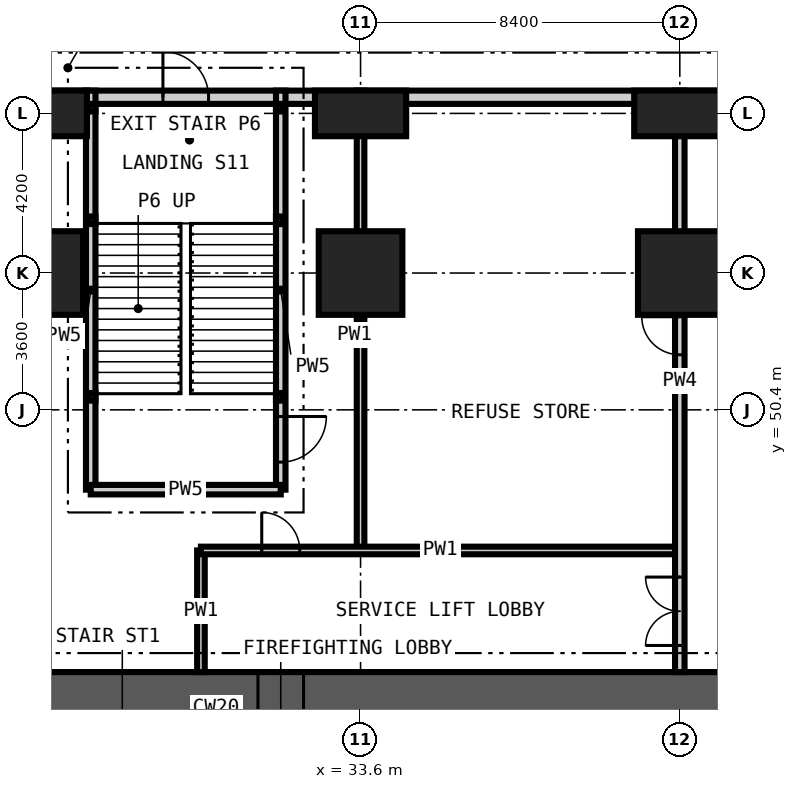
"""IFC4 building model, lengths in metres.
Left out: names, types, materials, properties, quantities, classifications, styles, units other than length and angle.
Written with IfcOpenShell. Run it as: python <this file> out.ifc"""

import sys

from ifc_helpers import new_model, si_unit, direction, frame, frame_2d, origin, origin_2d, place, context, subcontext, project, spatial, rectangle, hollow_rectangle, extrude, element, fill, save


model = new_model("IFC4")
c1 = context("Model", 3, precision=1e-05, world=origin(), true_north=direction((0.0, 1.0)))
c2 = subcontext(c1, "Body", "Model", "MODEL_VIEW")
j1 = project(units=[si_unit("LENGTHUNIT", "METRE"), si_unit("PLANEANGLEUNIT", "RADIAN")], contexts=[c1])
p1 = place(None, origin())
s1 = spatial("IfcSite", under=j1, at=p1, CompositionType="ELEMENT")
p2 = place(p1, origin())
s2 = spatial("IfcBuilding", under=s1, at=p2, CompositionType="ELEMENT")
p3 = place(p2, origin())
s3 = spatial("IfcBuildingStorey", under=s2, at=p3, CompositionType="ELEMENT", Elevation=0.0)
p4 = place(p3, frame((25.2, 54.0, -0.3), z_axis=(0.0, 0.0, 1.0), x_axis=(1.0, 0.0, 0.0)))
e1 = element("IfcColumn", 1, at=p4, inside=s3, PredefinedType="COLUMN", context=c2, shape_type="SweptSolid", body=[
    extrude(rectangle(XDim=2.2, YDim=2.2, at=origin_2d()), origin(), (0.0, 0.0, 1.0), 6.0),
])
p5 = place(p3, frame((25.2, 58.2, -0.3), z_axis=(0.0, 0.0, 1.0), x_axis=(1.0, 0.0, 0.0)))
e2 = element("IfcColumn", 2, at=p5, inside=s3, PredefinedType="COLUMN", context=c2, shape_type="SweptSolid", body=[
    extrude(rectangle(XDim=2.4, YDim=1.2, at=origin_2d()), origin(), (0.0, 0.0, 1.0), 6.0),
])
p6 = place(p3, frame((33.6, 54.0, -0.3), z_axis=(0.0, 0.0, 1.0), x_axis=(1.0, 0.0, 0.0)))
e3 = element("IfcColumn", 3, at=p6, inside=s3, PredefinedType="COLUMN", context=c2, shape_type="SweptSolid", body=[
    extrude(rectangle(XDim=2.2, YDim=2.2, at=origin_2d()), origin(), (0.0, 0.0, 1.0), 6.0),
])
p7 = place(p3, frame((33.6, 58.2, -0.3), z_axis=(0.0, 0.0, 1.0), x_axis=(1.0, 0.0, 0.0)))
e4 = element("IfcColumn", 4, at=p7, inside=s3, PredefinedType="COLUMN", context=c2, shape_type="SweptSolid", body=[
    extrude(rectangle(XDim=2.4, YDim=1.2, at=origin_2d()), origin(), (0.0, 0.0, 1.0), 6.0),
])
p8 = place(p3, frame((42.0, 54.0, -0.3), z_axis=(0.0, 0.0, 1.0), x_axis=(1.0, 0.0, 0.0)))
e5 = element("IfcColumn", 5, at=p8, inside=s3, PredefinedType="COLUMN", context=c2, shape_type="SweptSolid", body=[
    extrude(rectangle(XDim=2.2, YDim=2.2, at=origin_2d()), origin(), (0.0, 0.0, 1.0), 6.0),
])
p9 = place(p3, frame((42.0, 58.2, -0.3), z_axis=(0.0, 0.0, 1.0), x_axis=(1.0, 0.0, 0.0)))
e6 = element("IfcColumn", 6, at=p9, inside=s3, PredefinedType="COLUMN", context=c2, shape_type="SweptSolid", body=[
    extrude(rectangle(XDim=2.4, YDim=1.2, at=origin_2d()), origin(), (0.0, 0.0, 1.0), 6.0),
])
p10 = place(p3, frame((43.5, 42.5, -0.3), z_axis=(0.0, 0.0, 1.0), x_axis=(-1.0, 0.0, 0.0)))
e7 = element("IfcWall", 7, at=p10, inside=s3, PredefinedType="SHEAR", context=c2, shape_type="SweptSolid", body=[
    extrude(rectangle(XDim=28.2, YDim=2.0, at=frame_2d((14.1, 0.0))), origin(), (0.0, 0.0, 1.0), 6.0),
])
p11 = place(p10, frame((22.0, 0.0, 0.3)))
e8 = element("IfcOpeningElement", 8, at=p11, cuts=e7, PredefinedType="OPENING", context=c2, shape_type="SweptSolid", body=[
    extrude(rectangle(XDim=1.0, YDim=2.1, at=frame_2d((0.5, 1.05))), frame((0.0, 1.01, 0.0), z_axis=(0.0, -1.0, 0.0), x_axis=(1.0, 0.0, 0.0)), (0.0, 0.0, 1.0), 2.02),
])
p12 = place(p10, frame((11.4, 0.0, 0.3)))
e9 = element("IfcOpeningElement", 9, at=p12, cuts=e7, PredefinedType="OPENING", context=c2, shape_type="SweptSolid", body=[
    extrude(rectangle(XDim=1.2, YDim=2.2, at=frame_2d((0.6, 1.1))), frame((0.0, 1.01, 0.0), z_axis=(0.0, -1.0, 0.0), x_axis=(1.0, 0.0, 0.0)), (0.0, 0.0, 1.0), 2.02),
])
p13 = place(p3, frame((58.8, 58.625, 0.0), z_axis=(0.0, 0.0, 1.0), x_axis=(-1.0, 0.0, 0.0)))
e10 = element("IfcWall", 10, at=p13, inside=s3, PredefinedType="SOLIDWALL", context=c2, shape_type="SweptSolid", body=[
    extrude(rectangle(XDim=92.4, YDim=0.35, at=frame_2d((46.2, 0.0))), origin(), (0.0, 0.0, 1.0), 5.7),
])
p14 = place(p13, frame((85.2, 0.0, 0.0)))
e11 = element("IfcOpeningElement", 11, at=p14, cuts=e10, PredefinedType="OPENING", context=c2, shape_type="SweptSolid", body=[
    extrude(rectangle(XDim=1.8, YDim=2.7, at=frame_2d((0.9, 1.35))), frame((0.0, 0.185, 0.0), z_axis=(0.0, -1.0, 0.0), x_axis=(1.0, 0.0, 0.0)), (0.0, 0.0, 1.0), 0.37),
])
p15 = place(p13, frame((87.2, 0.0, 0.9)))
e12 = element("IfcOpeningElement", 12, at=p15, cuts=e10, PredefinedType="OPENING", context=c2, shape_type="SweptSolid", body=[
    extrude(rectangle(XDim=2.4, YDim=2.4, at=frame_2d((1.2, 1.2))), frame((0.0, 0.185, 0.0), z_axis=(0.0, -1.0, 0.0), x_axis=(1.0, 0.0, 0.0)), (0.0, 0.0, 1.0), 0.37),
])
p16 = place(p13, frame((80.7, 0.0, 0.9)))
e13 = element("IfcOpeningElement", 13, at=p16, cuts=e10, PredefinedType="OPENING", context=c2, shape_type="SweptSolid", body=[
    extrude(rectangle(XDim=2.4, YDim=2.4, at=frame_2d((1.2, 1.2))), frame((0.0, 0.185, 0.0), z_axis=(0.0, -1.0, 0.0), x_axis=(1.0, 0.0, 0.0)), (0.0, 0.0, 1.0), 0.37),
])
p17 = place(p13, frame((76.2, 0.0, 0.9)))
e14 = element("IfcOpeningElement", 14, at=p17, cuts=e10, PredefinedType="OPENING", context=c2, shape_type="SweptSolid", body=[
    extrude(rectangle(XDim=2.4, YDim=2.4, at=frame_2d((1.2, 1.2))), frame((0.0, 0.185, 0.0), z_axis=(0.0, -1.0, 0.0), x_axis=(1.0, 0.0, 0.0)), (0.0, 0.0, 1.0), 0.37),
])
p18 = place(p13, frame((71.9, 0.0, 0.0)))
e15 = element("IfcOpeningElement", 15, at=p18, cuts=e10, PredefinedType="OPENING", context=c2, shape_type="SweptSolid", body=[
    extrude(rectangle(XDim=1.2, YDim=2.4, at=frame_2d((0.6, 1.2))), frame((0.0, 0.185, 0.0), z_axis=(0.0, -1.0, 0.0), x_axis=(1.0, 0.0, 0.0)), (0.0, 0.0, 1.0), 0.37),
])
p19 = place(p13, frame((63.5, 0.0, 0.0)))
e16 = element("IfcOpeningElement", 16, at=p19, cuts=e10, PredefinedType="OPENING", context=c2, shape_type="SweptSolid", body=[
    extrude(rectangle(XDim=1.2, YDim=2.4, at=frame_2d((0.6, 1.2))), frame((0.0, 0.185, 0.0), z_axis=(0.0, -1.0, 0.0), x_axis=(1.0, 0.0, 0.0)), (0.0, 0.0, 1.0), 0.37),
])
p20 = place(p13, frame((59.0, 0.0, 0.0)))
e17 = element("IfcOpeningElement", 17, at=p20, cuts=e10, PredefinedType="OPENING", context=c2, shape_type="SweptSolid", body=[
    extrude(rectangle(XDim=2.4, YDim=3.0, at=frame_2d((1.2, 1.5))), frame((0.0, 0.185, 0.0), z_axis=(0.0, -1.0, 0.0), x_axis=(1.0, 0.0, 0.0)), (0.0, 0.0, 1.0), 0.37),
])
p21 = place(p13, frame((53.4, 0.0, 0.9)))
e18 = element("IfcOpeningElement", 18, at=p21, cuts=e10, PredefinedType="OPENING", context=c2, shape_type="SweptSolid", body=[
    extrude(rectangle(XDim=2.4, YDim=2.4, at=frame_2d((1.2, 1.2))), frame((0.0, 0.185, 0.0), z_axis=(0.0, -1.0, 0.0), x_axis=(1.0, 0.0, 0.0)), (0.0, 0.0, 1.0), 0.37),
])
p22 = place(p13, frame((43.25, 0.0, 0.0)))
e19 = element("IfcOpeningElement", 19, at=p22, cuts=e10, PredefinedType="OPENING", context=c2, shape_type="SweptSolid", body=[
    extrude(rectangle(XDim=2.4, YDim=3.0, at=frame_2d((1.2, 1.5))), frame((0.0, 0.185, 0.0), z_axis=(0.0, -1.0, 0.0), x_axis=(1.0, 0.0, 0.0)), (0.0, 0.0, 1.0), 0.37),
])
p23 = place(p13, frame((37.7, 0.0, 0.0)))
e20 = element("IfcOpeningElement", 20, at=p23, cuts=e10, PredefinedType="OPENING", context=c2, shape_type="SweptSolid", body=[
    extrude(rectangle(XDim=1.2, YDim=2.4, at=frame_2d((0.6, 1.2))), frame((0.0, 0.185, 0.0), z_axis=(0.0, -1.0, 0.0), x_axis=(1.0, 0.0, 0.0)), (0.0, 0.0, 1.0), 0.37),
])
p24 = place(p13, frame((29.2, 0.0, 0.0)))
e21 = element("IfcOpeningElement", 21, at=p24, cuts=e10, PredefinedType="OPENING", context=c2, shape_type="SweptSolid", body=[
    extrude(rectangle(XDim=1.2, YDim=2.4, at=frame_2d((0.6, 1.2))), frame((0.0, 0.185, 0.0), z_axis=(0.0, -1.0, 0.0), x_axis=(1.0, 0.0, 0.0)), (0.0, 0.0, 1.0), 0.37),
])
p25 = place(p13, frame((3.5, 0.0, 0.0)))
e22 = element("IfcOpeningElement", 22, at=p25, cuts=e10, PredefinedType="OPENING", context=c2, shape_type="SweptSolid", body=[
    extrude(rectangle(XDim=3.6, YDim=4.5, at=frame_2d((1.8, 2.25))), frame((0.0, 0.185, 0.0), z_axis=(0.0, -1.0, 0.0), x_axis=(1.0, 0.0, 0.0)), (0.0, 0.0, 1.0), 0.37),
])
p26 = place(p13, frame((11.4, 0.0, 0.9)))
e23 = element("IfcOpeningElement", 23, at=p26, cuts=e10, PredefinedType="OPENING", context=c2, shape_type="SweptSolid", body=[
    extrude(rectangle(XDim=2.4, YDim=2.4, at=frame_2d((1.2, 1.2))), frame((0.0, 0.185, 0.0), z_axis=(0.0, -1.0, 0.0), x_axis=(1.0, 0.0, 0.0)), (0.0, 0.0, 1.0), 0.37),
])
p27 = place(p3, frame((29.4, 43.5, 0.0), z_axis=(0.0, 0.0, 1.0), x_axis=(0.0, 1.0, 0.0)))
e24 = element("IfcWall", 24, at=p27, inside=s3, PredefinedType="PARTITIONING", context=c2, shape_type="SweptSolid", body=[
    extrude(rectangle(XDim=3.2, YDim=0.2, at=frame_2d((1.6, 0.0))), origin(), (0.0, 0.0, 1.0), 5.7),
])
p28 = place(p3, frame((33.6, 46.7, 0.0), z_axis=(0.0, 0.0, 1.0), x_axis=(0.0, 1.0, 0.0)))
e25 = element("IfcWall", 25, at=p28, inside=s3, PredefinedType="PARTITIONING", context=c2, shape_type="SweptSolid", body=[
    extrude(rectangle(XDim=12.1, YDim=0.2, at=frame_2d((6.05, 0.0))), origin(), (0.0, 0.0, 1.0), 5.7),
])
p29 = place(p3, frame((29.4, 46.7, 0.0), z_axis=(0.0, 0.0, 1.0), x_axis=(1.0, 0.0, 0.0)))
e26 = element("IfcWall", 26, at=p29, inside=s3, PredefinedType="PARTITIONING", context=c2, shape_type="SweptSolid", body=[
    extrude(rectangle(XDim=12.6, YDim=0.2, at=frame_2d((6.3, 0.0))), origin(), (0.0, 0.0, 1.0), 5.7),
])
p30 = place(p29, frame((1.6, 0.0, 0.0)))
e27 = element("IfcOpeningElement", 27, at=p30, cuts=e26, PredefinedType="OPENING", context=c2, shape_type="SweptSolid", body=[
    extrude(rectangle(XDim=1.0, YDim=2.1, at=frame_2d((0.5, 1.05))), frame((0.0, 0.11, 0.0), z_axis=(0.0, -1.0, 0.0), x_axis=(1.0, 0.0, 0.0)), (0.0, 0.0, 1.0), 0.22),
])
p31 = place(p3, frame((42.0, 43.5, 0.0), z_axis=(0.0, 0.0, 1.0), x_axis=(0.0, 1.0, 0.0)))
e28 = element("IfcWall", 28, at=p31, inside=s3, PredefinedType="PARTITIONING", context=c2, shape_type="SweptSolid", body=[
    extrude(rectangle(XDim=15.3, YDim=0.25, at=frame_2d((7.65, 0.0))), origin(), (0.0, 0.0, 1.0), 5.7),
])
p32 = place(p31, frame((0.7, 0.0, 0.0)))
e29 = element("IfcOpeningElement", 29, at=p32, cuts=e28, PredefinedType="OPENING", context=c2, shape_type="SweptSolid", body=[
    extrude(rectangle(XDim=1.8, YDim=2.4, at=frame_2d((0.9, 1.2))), frame((0.0, 0.135, 0.0), z_axis=(0.0, -1.0, 0.0), x_axis=(1.0, 0.0, 0.0)), (0.0, 0.0, 1.0), 0.27),
])
p33 = place(p31, frame((8.35, 0.0, 0.0)))
e30 = element("IfcOpeningElement", 30, at=p33, cuts=e28, PredefinedType="OPENING", context=c2, shape_type="SweptSolid", body=[
    extrude(rectangle(XDim=1.0, YDim=2.1, at=frame_2d((0.5, 1.05))), frame((0.0, 0.135, 0.0), z_axis=(0.0, -1.0, 0.0), x_axis=(1.0, 0.0, 0.0)), (0.0, 0.0, 1.0), 0.27),
])
p34 = place(p3, frame((26.5, 48.3, 0.0), z_axis=(0.0, 0.0, 1.0), x_axis=(0.0, 1.0, 0.0)))
e31 = element("IfcWall", 31, at=p34, inside=s3, PredefinedType="PARTITIONING", context=c2, shape_type="SweptSolid", body=[
    extrude(rectangle(XDim=10.5, YDim=0.25, at=frame_2d((5.25, 0.0))), origin(), (0.0, 0.0, 1.0), 5.7),
])
p35 = place(p3, frame((31.5, 48.3, 0.0), z_axis=(0.0, 0.0, 1.0), x_axis=(0.0, 1.0, 0.0)))
e32 = element("IfcWall", 32, at=p35, inside=s3, PredefinedType="PARTITIONING", context=c2, shape_type="SweptSolid", body=[
    extrude(rectangle(XDim=10.5, YDim=0.25, at=frame_2d((5.25, 0.0))), origin(), (0.0, 0.0, 1.0), 5.7),
])
p36 = place(p35, frame((0.725, 0.0, 0.0)))
e33 = element("IfcOpeningElement", 33, at=p36, cuts=e32, PredefinedType="OPENING", context=c2, shape_type="SweptSolid", body=[
    extrude(rectangle(XDim=1.2, YDim=2.2, at=frame_2d((0.6, 1.1))), frame((0.0, 0.135, 0.0), z_axis=(0.0, -1.0, 0.0), x_axis=(1.0, 0.0, 0.0)), (0.0, 0.0, 1.0), 0.27),
])
p37 = place(p3, frame((26.5, 48.3, 0.0), z_axis=(0.0, 0.0, 1.0), x_axis=(1.0, 0.0, 0.0)))
e34 = element("IfcWall", 34, at=p37, inside=s3, PredefinedType="PARTITIONING", context=c2, shape_type="SweptSolid", body=[
    extrude(rectangle(XDim=5.0, YDim=0.25, at=frame_2d((2.5, 0.0))), origin(), (0.0, 0.0, 1.0), 5.7),
])
for number, where, z_axis, x_axis in (
    (35, (26.525, 50.742, -0.3), (0.0, 0.0, 1.0), (1.0, 0.0, 0.0)),
    (36, (31.475, 50.742, -0.3), (0.0, 0.0, 1.0), (1.0, 0.0, 0.0)),
    (37, (26.525, 55.387, -0.3), (0.0, 0.0, 1.0), (1.0, 0.0, 0.0)),
    (38, (31.475, 55.387, -0.3), (0.0, 0.0, 1.0), (1.0, 0.0, 0.0)),
    (39, (26.525, 58.35, -0.3), (0.0, 0.0, 1.0), (1.0, 0.0, 0.0)),
    (40, (31.475, 58.35, -0.3), (0.0, 0.0, 1.0), (1.0, 0.0, 0.0)),
):
    element("IfcColumn", number, at=place(p3, frame(where, z_axis=z_axis, x_axis=x_axis)), inside=s3, PredefinedType="COLUMN", context=c2, shape_type="SweptSolid", body=[
        extrude(hollow_rectangle(XDim=0.2, YDim=0.2, WallThickness=0.01, at=origin_2d()), origin(), (0.0, 0.0, 1.0), 6.0),
    ])
p38 = place(p24, frame((1.2, 0.0, 0.0), z_axis=(0.0, 0.0, 1.0), x_axis=(-1.0, 0.0, 0.0)))
e41 = element("IfcDoor", 41, at=p38, inside=s3, OperationType="SINGLE_SWING_LEFT", PredefinedType="DOOR", context=c2, shape_type="SweptSolid", body=[
    extrude(rectangle(XDim=1.2, YDim=2.4, at=frame_2d((0.6, 1.2))), frame((0.0, 0.025, 0.0), z_axis=(0.0, -1.0, 0.0), x_axis=(1.0, 0.0, 0.0)), (0.0, 0.0, 1.0), 0.05),
])
fill(e21, e41)
p39 = place(p36, frame((1.2, 0.0, 0.0), z_axis=(0.0, 0.0, 1.0), x_axis=(-1.0, 0.0, 0.0)))
e42 = element("IfcDoor", 42, at=p39, inside=s3, OperationType="SINGLE_SWING_LEFT", PredefinedType="DOOR", context=c2, shape_type="SweptSolid", body=[
    extrude(rectangle(XDim=1.2, YDim=2.2, at=frame_2d((0.6, 1.1))), frame((0.0, 0.025, 0.0), z_axis=(0.0, -1.0, 0.0), x_axis=(1.0, 0.0, 0.0)), (0.0, 0.0, 1.0), 0.05),
])
fill(e33, e42)
p40 = place(p12, origin())
e43 = element("IfcDoor", 43, at=p40, inside=s3, OperationType="SINGLE_SWING_LEFT", PredefinedType="DOOR", context=c2, shape_type="SweptSolid", body=[
    extrude(rectangle(XDim=1.2, YDim=2.2, at=frame_2d((0.6, 1.1))), frame((0.0, 0.025, 0.0), z_axis=(0.0, -1.0, 0.0), x_axis=(1.0, 0.0, 0.0)), (0.0, 0.0, 1.0), 0.05),
])
fill(e9, e43)
p41 = place(p32, origin())
e44 = element("IfcDoor", 44, at=p41, inside=s3, OperationType="DOUBLE_DOOR_DOUBLE_SWING", PredefinedType="DOOR", context=c2, shape_type="SweptSolid", body=[
    extrude(rectangle(XDim=1.8, YDim=2.4, at=frame_2d((0.9, 1.2))), frame((0.0, 0.025, 0.0), z_axis=(0.0, -1.0, 0.0), x_axis=(1.0, 0.0, 0.0)), (0.0, 0.0, 1.0), 0.05),
])
fill(e29, e44)
p42 = place(p33, origin())
e45 = element("IfcDoor", 45, at=p42, inside=s3, OperationType="SINGLE_SWING_RIGHT", PredefinedType="DOOR", context=c2, shape_type="SweptSolid", body=[
    extrude(rectangle(XDim=1.0, YDim=2.1, at=frame_2d((0.5, 1.05))), frame((0.0, 0.025, 0.0), z_axis=(0.0, -1.0, 0.0), x_axis=(1.0, 0.0, 0.0)), (0.0, 0.0, 1.0), 0.05),
])
fill(e30, e45)
p43 = place(p30, origin())
e46 = element("IfcDoor", 46, at=p43, inside=s3, OperationType="SINGLE_SWING_LEFT", PredefinedType="DOOR", context=c2, shape_type="SweptSolid", body=[
    extrude(rectangle(XDim=1.0, YDim=2.1, at=frame_2d((0.5, 1.05))), frame((0.0, 0.025, 0.0), z_axis=(0.0, -1.0, 0.0), x_axis=(1.0, 0.0, 0.0)), (0.0, 0.0, 1.0), 0.05),
])
fill(e27, e46)
save(model, sys.argv[1])
